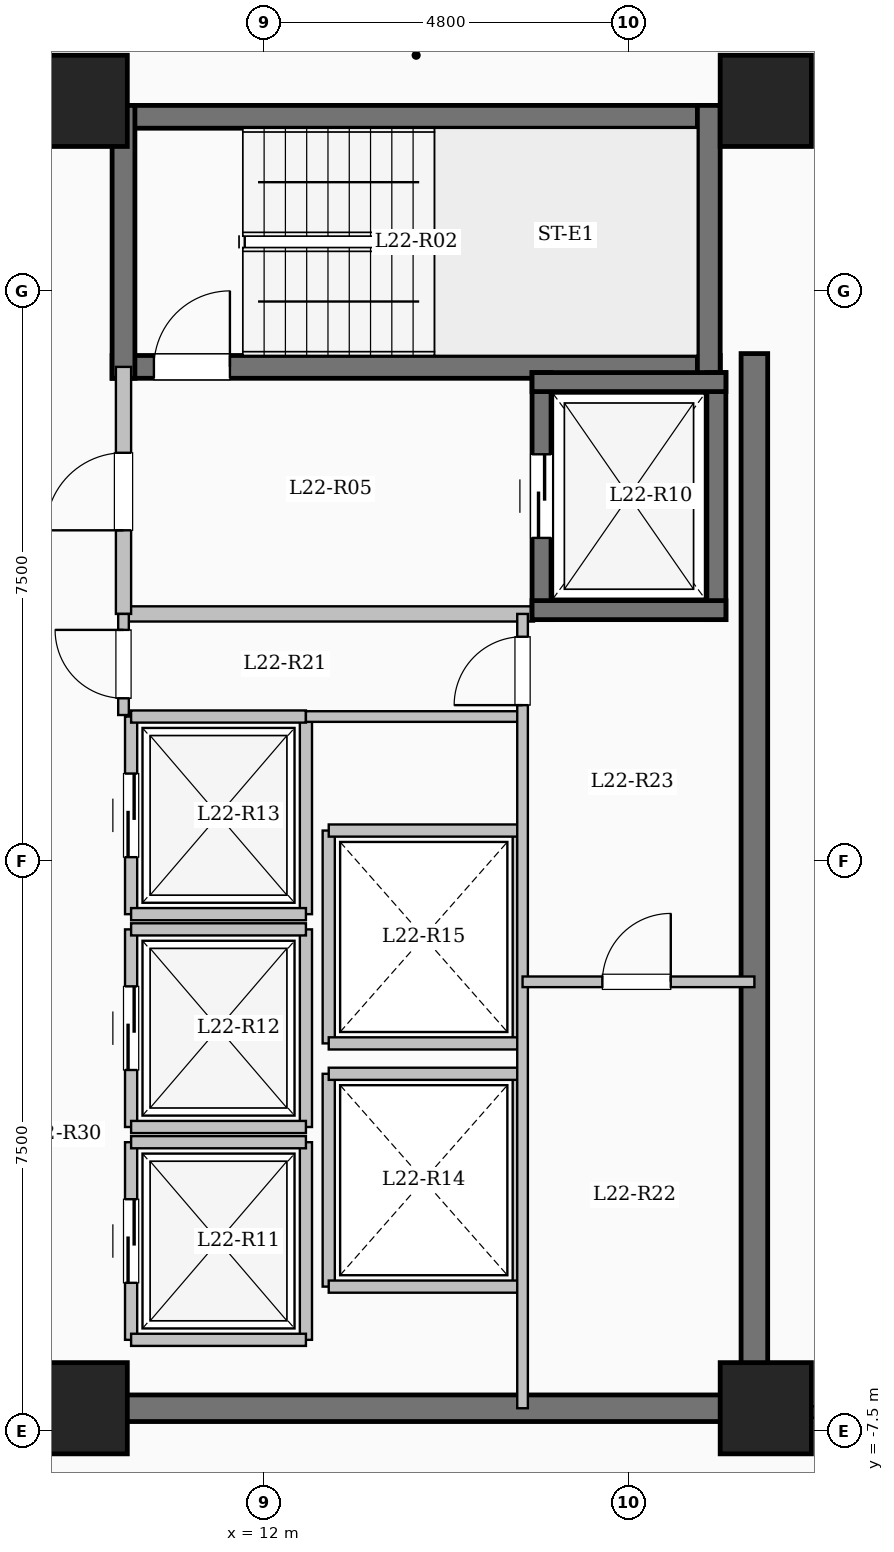
"""IFC4 building model, lengths in metres.
Left out: names, types, materials, properties, quantities, classifications, styles, units other than length and angle.
Written with IfcOpenShell. Run it as: python <this file> out.ifc"""

import sys

from ifc_helpers import new_model, si_unit, direction, frame, frame_2d, origin, origin_2d, place, context, subcontext, project, spatial, rectangle, extrude, element, fill, save


model = new_model("IFC4")
c1 = context("Model", 3, precision=1e-05, world=origin(), true_north=direction((0.0, 1.0)))
c2 = subcontext(c1, "Body", "Model", "MODEL_VIEW")
j1 = project(units=[si_unit("LENGTHUNIT", "METRE"), si_unit("PLANEANGLEUNIT", "RADIAN")], contexts=[c1])
p1 = place(None, origin())
s1 = spatial("IfcSite", under=j1, at=p1, CompositionType="ELEMENT")
p2 = place(p1, origin())
s2 = spatial("IfcBuilding", under=s1, at=p2, CompositionType="ELEMENT")
p3 = place(p2, frame((0.0, 0.0, 85.0)))
s3 = spatial("IfcBuildingStorey", under=s2, at=p3, CompositionType="ELEMENT", Elevation=85.0)
for number, where, z_axis, x_axis in (
    (1, (9.6, -7.2, 0.0), (0.0, 0.0, 1.0), (1.0, 0.0, 0.0)),
    (2, (9.6, 10.0, 0.0), (0.0, 0.0, 1.0), (1.0, 0.0, 0.0)),
    (3, (18.6, -7.2, 0.0), (0.0, 0.0, 1.0), (1.0, 0.0, 0.0)),
    (4, (18.6, 10.0, 0.0), (0.0, 0.0, 1.0), (1.0, 0.0, 0.0)),
):
    element("IfcColumn", number, at=place(p3, frame(where, z_axis=z_axis, x_axis=x_axis)), inside=s3, PredefinedType="COLUMN", context=c2, shape_type="SweptSolid", body=[
        extrude(rectangle(XDim=1.2, YDim=1.2, at=origin_2d()), origin(), (0.0, 0.0, 1.0), 3.35),
    ])
p4 = place(p3, frame((10.0, 9.79, 0.0), z_axis=(0.0, 0.0, 1.0), x_axis=(1.0, 0.0, 0.0)))
e5 = element("IfcWall", 5, at=p4, inside=s3, PredefinedType="SHEAR", context=c2, shape_type="SweptSolid", body=[
    extrude(rectangle(XDim=8.0, YDim=0.3, at=frame_2d((4.0, 0.0))), origin(), (0.0, 0.0, 1.0), 3.35),
])
p5 = place(p3, frame((10.0, 6.5, 0.0), z_axis=(0.0, 0.0, 1.0), x_axis=(1.0, 0.0, 0.0)))
e6 = element("IfcWall", 6, at=p5, inside=s3, PredefinedType="SHEAR", context=c2, shape_type="SweptSolid", body=[
    extrude(rectangle(XDim=8.0, YDim=0.3, at=frame_2d((4.0, 0.0))), origin(), (0.0, 0.0, 1.0), 3.35),
])
p6 = place(p5, frame((0.55, 0.0, 0.0)))
e7 = element("IfcOpeningElement", 7, at=p6, cuts=e6, PredefinedType="OPENING", context=c2, shape_type="SweptSolid", body=[
    extrude(rectangle(XDim=1.0, YDim=2.15, at=frame_2d((0.5, 1.075))), frame((0.0, 0.16, 0.0), z_axis=(0.0, -1.0, 0.0), x_axis=(1.0, 0.0, 0.0)), (0.0, 0.0, 1.0), 0.32),
])
for number, where, z_axis, x_axis in (
    (8, (10.15, 6.35, 0.0), (0.0, 0.0, 1.0), (0.0, 1.0, 0.0)),
    (9, (17.85, 6.35, 0.0), (0.0, 0.0, 1.0), (0.0, 1.0, 0.0)),
):
    element("IfcWall", number, at=place(p3, frame(where, z_axis=z_axis, x_axis=x_axis)), inside=s3, PredefinedType="SHEAR", context=c2, shape_type="SweptSolid", body=[
        extrude(rectangle(XDim=3.59, YDim=0.3, at=frame_2d((1.795, 0.0))), origin(), (0.0, 0.0, 1.0), 3.35),
    ])
p7 = place(p3, frame((10.15, 3.25, 0.0), z_axis=(0.0, 0.0, 1.0), x_axis=(1.0, 0.0, 0.0)))
e10 = element("IfcWall", 10, at=p7, inside=s3, PredefinedType="SOLIDWALL", context=c2, shape_type="SweptSolid", body=[
    extrude(rectangle(XDim=5.4, YDim=0.2, at=frame_2d((2.7, 0.0))), origin(), (0.0, 0.0, 1.0), 3.1),
])
p8 = place(p3, frame((10.15, 3.25, 0.0), z_axis=(0.0, 0.0, 1.0), x_axis=(0.0, 1.0, 0.0)))
e11 = element("IfcWall", 11, at=p8, inside=s3, PredefinedType="SOLIDWALL", context=c2, shape_type="SweptSolid", body=[
    extrude(rectangle(XDim=3.25, YDim=0.2, at=frame_2d((1.625, 0.0))), origin(), (0.0, 0.0, 1.0), 3.1),
])
p9 = place(p8, frame((1.1, 0.0, 0.0)))
e12 = element("IfcOpeningElement", 12, at=p9, cuts=e11, PredefinedType="OPENING", context=c2, shape_type="SweptSolid", body=[
    extrude(rectangle(XDim=1.02, YDim=2.15, at=frame_2d((0.51, 1.075))), frame((0.0, 0.11, 0.0), z_axis=(0.0, -1.0, 0.0), x_axis=(1.0, 0.0, 0.0)), (0.0, 0.0, 1.0), 0.22),
])
p10 = place(p3, frame((15.65, 3.175, 0.0), z_axis=(0.0, 0.0, 1.0), x_axis=(0.0, 1.0, 0.0)))
e13 = element("IfcWall", 13, at=p10, inside=s3, PredefinedType="SHEAR", context=c2, shape_type="SweptSolid", body=[
    extrude(rectangle(XDim=3.25, YDim=0.25, at=frame_2d((1.625, 0.0))), origin(), (0.0, 0.0, 1.0), 3.35),
])
p11 = place(p10, frame((1.075, 0.0, 0.0)))
e14 = element("IfcOpeningElement", 14, at=p11, cuts=e13, PredefinedType="OPENING", context=c2, shape_type="SweptSolid", body=[
    extrude(rectangle(XDim=1.1, YDim=2.15, at=frame_2d((0.55, 1.075))), frame((0.0, 0.135, 0.0), z_axis=(0.0, -1.0, 0.0), x_axis=(1.0, 0.0, 0.0)), (0.0, 0.0, 1.0), 0.27),
])
p12 = place(p3, frame((17.95, 3.175, 0.0), z_axis=(0.0, 0.0, 1.0), x_axis=(0.0, 1.0, 0.0)))
e15 = element("IfcWall", 15, at=p12, inside=s3, PredefinedType="SHEAR", context=c2, shape_type="SweptSolid", body=[
    extrude(rectangle(XDim=3.25, YDim=0.25, at=frame_2d((1.625, 0.0))), origin(), (0.0, 0.0, 1.0), 3.35),
])
for number, where, z_axis, x_axis in (
    (16, (15.525, 3.3, 0.0), (0.0, 0.0, 1.0), (1.0, 0.0, 0.0)),
    (17, (15.525, 6.3, 0.0), (0.0, 0.0, 1.0), (1.0, 0.0, 0.0)),
):
    element("IfcWall", number, at=place(p3, frame(where, z_axis=z_axis, x_axis=x_axis)), inside=s3, PredefinedType="SHEAR", context=c2, shape_type="SweptSolid", body=[
        extrude(rectangle(XDim=2.55, YDim=0.25, at=frame_2d((1.275, 0.0))), origin(), (0.0, 0.0, 1.0), 3.35),
    ])
p13 = place(p3, frame((10.25, -6.3, 0.0), z_axis=(0.0, 0.0, 1.0), x_axis=(0.0, 1.0, 0.0)))
e18 = element("IfcWall", 18, at=p13, inside=s3, PredefinedType="SOLIDWALL", context=c2, shape_type="SweptSolid", body=[
    extrude(rectangle(XDim=2.6, YDim=0.16, at=frame_2d((1.3, 0.0))), origin(), (0.0, 0.0, 1.0), 3.1),
])
p14 = place(p13, frame((0.75, 0.0, 0.0)))
e19 = element("IfcOpeningElement", 19, at=p14, cuts=e18, PredefinedType="OPENING", context=c2, shape_type="SweptSolid", body=[
    extrude(rectangle(XDim=1.1, YDim=2.15, at=frame_2d((0.55, 1.075))), frame((0.0, 0.09, 0.0), z_axis=(0.0, -1.0, 0.0), x_axis=(1.0, 0.0, 0.0)), (0.0, 0.0, 1.0), 0.18),
])
p15 = place(p3, frame((12.55, -6.3, 0.0), z_axis=(0.0, 0.0, 1.0), x_axis=(0.0, 1.0, 0.0)))
e20 = element("IfcWall", 20, at=p15, inside=s3, PredefinedType="SOLIDWALL", context=c2, shape_type="SweptSolid", body=[
    extrude(rectangle(XDim=2.6, YDim=0.16, at=frame_2d((1.3, 0.0))), origin(), (0.0, 0.0, 1.0), 3.1),
])
for number, where, z_axis, x_axis in (
    (21, (10.25, -6.3, 0.0), (0.0, 0.0, 1.0), (1.0, 0.0, 0.0)),
    (22, (10.25, -3.7, 0.0), (0.0, 0.0, 1.0), (1.0, 0.0, 0.0)),
):
    element("IfcWall", number, at=place(p3, frame(where, z_axis=z_axis, x_axis=x_axis)), inside=s3, PredefinedType="SOLIDWALL", context=c2, shape_type="SweptSolid", body=[
        extrude(rectangle(XDim=2.3, YDim=0.16, at=frame_2d((1.15, 0.0))), origin(), (0.0, 0.0, 1.0), 3.1),
    ])
p16 = place(p3, frame((10.25, -3.5, 0.0), z_axis=(0.0, 0.0, 1.0), x_axis=(0.0, 1.0, 0.0)))
e23 = element("IfcWall", 23, at=p16, inside=s3, PredefinedType="SOLIDWALL", context=c2, shape_type="SweptSolid", body=[
    extrude(rectangle(XDim=2.6, YDim=0.16, at=frame_2d((1.3, 0.0))), origin(), (0.0, 0.0, 1.0), 3.1),
])
p17 = place(p16, frame((0.75, 0.0, 0.0)))
e24 = element("IfcOpeningElement", 24, at=p17, cuts=e23, PredefinedType="OPENING", context=c2, shape_type="SweptSolid", body=[
    extrude(rectangle(XDim=1.1, YDim=2.15, at=frame_2d((0.55, 1.075))), frame((0.0, 0.09, 0.0), z_axis=(0.0, -1.0, 0.0), x_axis=(1.0, 0.0, 0.0)), (0.0, 0.0, 1.0), 0.18),
])
p18 = place(p3, frame((12.55, -3.5, 0.0), z_axis=(0.0, 0.0, 1.0), x_axis=(0.0, 1.0, 0.0)))
e25 = element("IfcWall", 25, at=p18, inside=s3, PredefinedType="SOLIDWALL", context=c2, shape_type="SweptSolid", body=[
    extrude(rectangle(XDim=2.6, YDim=0.16, at=frame_2d((1.3, 0.0))), origin(), (0.0, 0.0, 1.0), 3.1),
])
for number, where, z_axis, x_axis in (
    (26, (10.25, -3.5, 0.0), (0.0, 0.0, 1.0), (1.0, 0.0, 0.0)),
    (27, (10.25, -0.9, 0.0), (0.0, 0.0, 1.0), (1.0, 0.0, 0.0)),
):
    element("IfcWall", number, at=place(p3, frame(where, z_axis=z_axis, x_axis=x_axis)), inside=s3, PredefinedType="SOLIDWALL", context=c2, shape_type="SweptSolid", body=[
        extrude(rectangle(XDim=2.3, YDim=0.16, at=frame_2d((1.15, 0.0))), origin(), (0.0, 0.0, 1.0), 3.1),
    ])
p19 = place(p3, frame((10.25, -0.7, 0.0), z_axis=(0.0, 0.0, 1.0), x_axis=(0.0, 1.0, 0.0)))
e28 = element("IfcWall", 28, at=p19, inside=s3, PredefinedType="SOLIDWALL", context=c2, shape_type="SweptSolid", body=[
    extrude(rectangle(XDim=2.6, YDim=0.16, at=frame_2d((1.3, 0.0))), origin(), (0.0, 0.0, 1.0), 3.1),
])
p20 = place(p19, frame((0.75, 0.0, 0.0)))
e29 = element("IfcOpeningElement", 29, at=p20, cuts=e28, PredefinedType="OPENING", context=c2, shape_type="SweptSolid", body=[
    extrude(rectangle(XDim=1.1, YDim=2.15, at=frame_2d((0.55, 1.075))), frame((0.0, 0.09, 0.0), z_axis=(0.0, -1.0, 0.0), x_axis=(1.0, 0.0, 0.0)), (0.0, 0.0, 1.0), 0.18),
])
p21 = place(p3, frame((12.55, -0.7, 0.0), z_axis=(0.0, 0.0, 1.0), x_axis=(0.0, 1.0, 0.0)))
e30 = element("IfcWall", 30, at=p21, inside=s3, PredefinedType="SOLIDWALL", context=c2, shape_type="SweptSolid", body=[
    extrude(rectangle(XDim=2.6, YDim=0.16, at=frame_2d((1.3, 0.0))), origin(), (0.0, 0.0, 1.0), 3.1),
])
for number, where, z_axis, x_axis in (
    (31, (10.25, -0.7, 0.0), (0.0, 0.0, 1.0), (1.0, 0.0, 0.0)),
    (32, (10.25, 1.9, 0.0), (0.0, 0.0, 1.0), (1.0, 0.0, 0.0)),
):
    element("IfcWall", number, at=place(p3, frame(where, z_axis=z_axis, x_axis=x_axis)), inside=s3, PredefinedType="SOLIDWALL", context=c2, shape_type="SweptSolid", body=[
        extrude(rectangle(XDim=2.3, YDim=0.16, at=frame_2d((1.15, 0.0))), origin(), (0.0, 0.0, 1.0), 3.1),
    ])
for number, where, z_axis, x_axis in (
    (33, (12.85, -5.6, 0.0), (0.0, 0.0, 1.0), (0.0, 1.0, 0.0)),
    (34, (15.35, -5.6, 0.0), (0.0, 0.0, 1.0), (0.0, 1.0, 0.0)),
):
    element("IfcWall", number, at=place(p3, frame(where, z_axis=z_axis, x_axis=x_axis)), inside=s3, PredefinedType="SOLIDWALL", context=c2, shape_type="SweptSolid", body=[
        extrude(rectangle(XDim=2.8, YDim=0.16, at=frame_2d((1.4, 0.0))), origin(), (0.0, 0.0, 1.0), 3.1),
    ])
for number, where, z_axis, x_axis in (
    (35, (12.85, -5.6, 0.0), (0.0, 0.0, 1.0), (1.0, 0.0, 0.0)),
    (36, (12.85, -2.8, 0.0), (0.0, 0.0, 1.0), (1.0, 0.0, 0.0)),
):
    element("IfcWall", number, at=place(p3, frame(where, z_axis=z_axis, x_axis=x_axis)), inside=s3, PredefinedType="SOLIDWALL", context=c2, shape_type="SweptSolid", body=[
        extrude(rectangle(XDim=2.5, YDim=0.16, at=frame_2d((1.25, 0.0))), origin(), (0.0, 0.0, 1.0), 3.1),
    ])
for number, where, z_axis, x_axis in (
    (37, (12.85, -2.4, 0.0), (0.0, 0.0, 1.0), (0.0, 1.0, 0.0)),
    (38, (15.35, -2.4, 0.0), (0.0, 0.0, 1.0), (0.0, 1.0, 0.0)),
):
    element("IfcWall", number, at=place(p3, frame(where, z_axis=z_axis, x_axis=x_axis)), inside=s3, PredefinedType="SOLIDWALL", context=c2, shape_type="SweptSolid", body=[
        extrude(rectangle(XDim=2.8, YDim=0.16, at=frame_2d((1.4, 0.0))), origin(), (0.0, 0.0, 1.0), 3.1),
    ])
for number, where, z_axis, x_axis in (
    (39, (12.85, -2.4, 0.0), (0.0, 0.0, 1.0), (1.0, 0.0, 0.0)),
    (40, (12.85, 0.4, 0.0), (0.0, 0.0, 1.0), (1.0, 0.0, 0.0)),
):
    element("IfcWall", number, at=place(p3, frame(where, z_axis=z_axis, x_axis=x_axis)), inside=s3, PredefinedType="SOLIDWALL", context=c2, shape_type="SweptSolid", body=[
        extrude(rectangle(XDim=2.5, YDim=0.16, at=frame_2d((1.25, 0.0))), origin(), (0.0, 0.0, 1.0), 3.1),
    ])
p22 = place(p3, frame((18.45, -7.375, 0.0), z_axis=(0.0, 0.0, 1.0), x_axis=(0.0, 1.0, 0.0)))
e41 = element("IfcWall", 41, at=p22, inside=s3, PredefinedType="SHEAR", context=c2, shape_type="SweptSolid", body=[
    extrude(rectangle(XDim=14.05, YDim=0.35, at=frame_2d((7.025, 0.0))), origin(), (0.0, 0.0, 1.0), 3.35),
])
p23 = place(p3, frame((10.075, -7.2, 0.0), z_axis=(0.0, 0.0, 1.0), x_axis=(1.0, 0.0, 0.0)))
e42 = element("IfcWall", 42, at=p23, inside=s3, PredefinedType="SHEAR", context=c2, shape_type="SweptSolid", body=[
    extrude(rectangle(XDim=8.55, YDim=0.35, at=frame_2d((4.275, 0.0))), origin(), (0.0, 0.0, 1.0), 3.35),
])
p24 = place(p3, frame((12.55, 1.9, 0.0), z_axis=(0.0, 0.0, 1.0), x_axis=(1.0, 0.0, 0.0)))
e43 = element("IfcWall", 43, at=p24, inside=s3, PredefinedType="PARTITIONING", context=c2, shape_type="SweptSolid", body=[
    extrude(rectangle(XDim=2.85, YDim=0.14, at=frame_2d((1.425, 0.0))), origin(), (0.0, 0.0, 1.0), 3.1),
])
p25 = place(p3, frame((10.15, 1.92, 0.0), z_axis=(0.0, 0.0, 1.0), x_axis=(0.0, 1.0, 0.0)))
e44 = element("IfcWall", 44, at=p25, inside=s3, PredefinedType="PARTITIONING", context=c2, shape_type="SweptSolid", body=[
    extrude(rectangle(XDim=1.33, YDim=0.14, at=frame_2d((0.665, 0.0))), origin(), (0.0, 0.0, 1.0), 3.1),
])
p26 = place(p25, frame((0.22, 0.0, 0.0)))
e45 = element("IfcOpeningElement", 45, at=p26, cuts=e44, PredefinedType="OPENING", context=c2, shape_type="SweptSolid", body=[
    extrude(rectangle(XDim=0.9, YDim=2.08, at=frame_2d((0.45, 1.04))), frame((0.0, 0.08, 0.0), z_axis=(0.0, -1.0, 0.0), x_axis=(1.0, 0.0, 0.0)), (0.0, 0.0, 1.0), 0.16),
])
p27 = place(p3, frame((15.4, -7.2, 0.0), z_axis=(0.0, 0.0, 1.0), x_axis=(0.0, 1.0, 0.0)))
e46 = element("IfcWall", 46, at=p27, inside=s3, PredefinedType="PARTITIONING", context=c2, shape_type="SweptSolid", body=[
    extrude(rectangle(XDim=10.45, YDim=0.14, at=frame_2d((5.225, 0.0))), origin(), (0.0, 0.0, 1.0), 3.1),
])
p28 = place(p27, frame((9.25, 0.0, 0.0)))
e47 = element("IfcOpeningElement", 47, at=p28, cuts=e46, PredefinedType="OPENING", context=c2, shape_type="SweptSolid", body=[
    extrude(rectangle(XDim=0.9, YDim=2.08, at=frame_2d((0.45, 1.04))), frame((0.0, 0.08, 0.0), z_axis=(0.0, -1.0, 0.0), x_axis=(1.0, 0.0, 0.0)), (0.0, 0.0, 1.0), 0.16),
])
p29 = place(p3, frame((15.4, -1.59, 0.0), z_axis=(0.0, 0.0, 1.0), x_axis=(1.0, 0.0, 0.0)))
e48 = element("IfcWall", 48, at=p29, inside=s3, PredefinedType="PARTITIONING", context=c2, shape_type="SweptSolid", body=[
    extrude(rectangle(XDim=3.05, YDim=0.14, at=frame_2d((1.525, 0.0))), origin(), (0.0, 0.0, 1.0), 3.1),
])
p30 = place(p29, frame((1.05, 0.0, 0.0)))
e49 = element("IfcOpeningElement", 49, at=p30, cuts=e48, PredefinedType="OPENING", context=c2, shape_type="SweptSolid", body=[
    extrude(rectangle(XDim=0.9, YDim=2.08, at=frame_2d((0.45, 1.04))), frame((0.0, 0.08, 0.0), z_axis=(0.0, -1.0, 0.0), x_axis=(1.0, 0.0, 0.0)), (0.0, 0.0, 1.0), 0.16),
])
p31 = place(p3, frame((18.45, -7.25, 0.0), z_axis=(0.0, 0.0, 1.0), x_axis=(1.0, 0.0, 0.0)))
e50 = element("IfcWall", 50, at=p31, inside=s3, PredefinedType="PARTITIONING", context=c2, shape_type="SweptSolid", body=[
    extrude(rectangle(XDim=8.43, YDim=0.15, at=frame_2d((4.215, 0.0))), origin(), (0.0, 0.0, 1.0), 3.1),
])
p32 = place(p31, frame((1.95, 0.0, 0.0)))
e51 = element("IfcOpeningElement", 51, at=p32, cuts=e50, PredefinedType="OPENING", context=c2, shape_type="SweptSolid", body=[
    extrude(rectangle(XDim=1.08, YDim=2.15, at=frame_2d((0.54, 1.075))), frame((0.0, 0.085, 0.0), z_axis=(0.0, -1.0, 0.0), x_axis=(1.0, 0.0, 0.0)), (0.0, 0.0, 1.0), 0.17),
])
p33 = place(p6, origin())
e52 = element("IfcDoor", 52, at=p33, inside=s3, OperationType="SINGLE_SWING_RIGHT", PredefinedType="DOOR", context=c2, shape_type="SweptSolid", body=[
    extrude(rectangle(XDim=1.0, YDim=2.15, at=frame_2d((0.5, 1.075))), frame((0.0, 0.025, 0.0), z_axis=(0.0, -1.0, 0.0), x_axis=(1.0, 0.0, 0.0)), (0.0, 0.0, 1.0), 0.05),
])
fill(e7, e52)
p34 = place(p9, origin())
e53 = element("IfcDoor", 53, at=p34, inside=s3, OperationType="SINGLE_SWING_LEFT", PredefinedType="DOOR", context=c2, shape_type="SweptSolid", body=[
    extrude(rectangle(XDim=1.02, YDim=2.15, at=frame_2d((0.51, 1.075))), frame((0.0, 0.025, 0.0), z_axis=(0.0, -1.0, 0.0), x_axis=(1.0, 0.0, 0.0)), (0.0, 0.0, 1.0), 0.05),
])
fill(e12, e53)
p35 = place(p11, origin())
e54 = element("IfcDoor", 54, at=p35, inside=s3, OperationType="SLIDING_TO_LEFT", PredefinedType="DOOR", context=c2, shape_type="SweptSolid", body=[
    extrude(rectangle(XDim=1.1, YDim=2.15, at=frame_2d((0.55, 1.075))), frame((0.0, 0.025, 0.0), z_axis=(0.0, -1.0, 0.0), x_axis=(1.0, 0.0, 0.0)), (0.0, 0.0, 1.0), 0.05),
])
fill(e14, e54)
p36 = place(p14, origin())
e55 = element("IfcDoor", 55, at=p36, inside=s3, OperationType="SLIDING_TO_LEFT", PredefinedType="DOOR", context=c2, shape_type="SweptSolid", body=[
    extrude(rectangle(XDim=1.1, YDim=2.15, at=frame_2d((0.55, 1.075))), frame((0.0, 0.025, 0.0), z_axis=(0.0, -1.0, 0.0), x_axis=(1.0, 0.0, 0.0)), (0.0, 0.0, 1.0), 0.05),
])
fill(e19, e55)
p37 = place(p17, origin())
e56 = element("IfcDoor", 56, at=p37, inside=s3, OperationType="SLIDING_TO_LEFT", PredefinedType="DOOR", context=c2, shape_type="SweptSolid", body=[
    extrude(rectangle(XDim=1.1, YDim=2.15, at=frame_2d((0.55, 1.075))), frame((0.0, 0.025, 0.0), z_axis=(0.0, -1.0, 0.0), x_axis=(1.0, 0.0, 0.0)), (0.0, 0.0, 1.0), 0.05),
])
fill(e24, e56)
p38 = place(p20, origin())
e57 = element("IfcDoor", 57, at=p38, inside=s3, OperationType="SLIDING_TO_LEFT", PredefinedType="DOOR", context=c2, shape_type="SweptSolid", body=[
    extrude(rectangle(XDim=1.1, YDim=2.15, at=frame_2d((0.55, 1.075))), frame((0.0, 0.025, 0.0), z_axis=(0.0, -1.0, 0.0), x_axis=(1.0, 0.0, 0.0)), (0.0, 0.0, 1.0), 0.05),
])
fill(e29, e57)
p39 = place(p26, origin())
e58 = element("IfcDoor", 58, at=p39, inside=s3, OperationType="SINGLE_SWING_RIGHT", PredefinedType="DOOR", context=c2, shape_type="SweptSolid", body=[
    extrude(rectangle(XDim=0.9, YDim=2.08, at=frame_2d((0.45, 1.04))), frame((0.0, 0.025, 0.0), z_axis=(0.0, -1.0, 0.0), x_axis=(1.0, 0.0, 0.0)), (0.0, 0.0, 1.0), 0.05),
])
fill(e45, e58)
p40 = place(p28, origin())
e59 = element("IfcDoor", 59, at=p40, inside=s3, OperationType="SINGLE_SWING_LEFT", PredefinedType="DOOR", context=c2, shape_type="SweptSolid", body=[
    extrude(rectangle(XDim=0.9, YDim=2.08, at=frame_2d((0.45, 1.04))), frame((0.0, 0.025, 0.0), z_axis=(0.0, -1.0, 0.0), x_axis=(1.0, 0.0, 0.0)), (0.0, 0.0, 1.0), 0.05),
])
fill(e47, e59)
p41 = place(p30, origin())
e60 = element("IfcDoor", 60, at=p41, inside=s3, OperationType="SINGLE_SWING_RIGHT", PredefinedType="DOOR", context=c2, shape_type="SweptSolid", body=[
    extrude(rectangle(XDim=0.9, YDim=2.08, at=frame_2d((0.45, 1.04))), frame((0.0, 0.025, 0.0), z_axis=(0.0, -1.0, 0.0), x_axis=(1.0, 0.0, 0.0)), (0.0, 0.0, 1.0), 0.05),
])
fill(e49, e60)
save(model, sys.argv[1])
